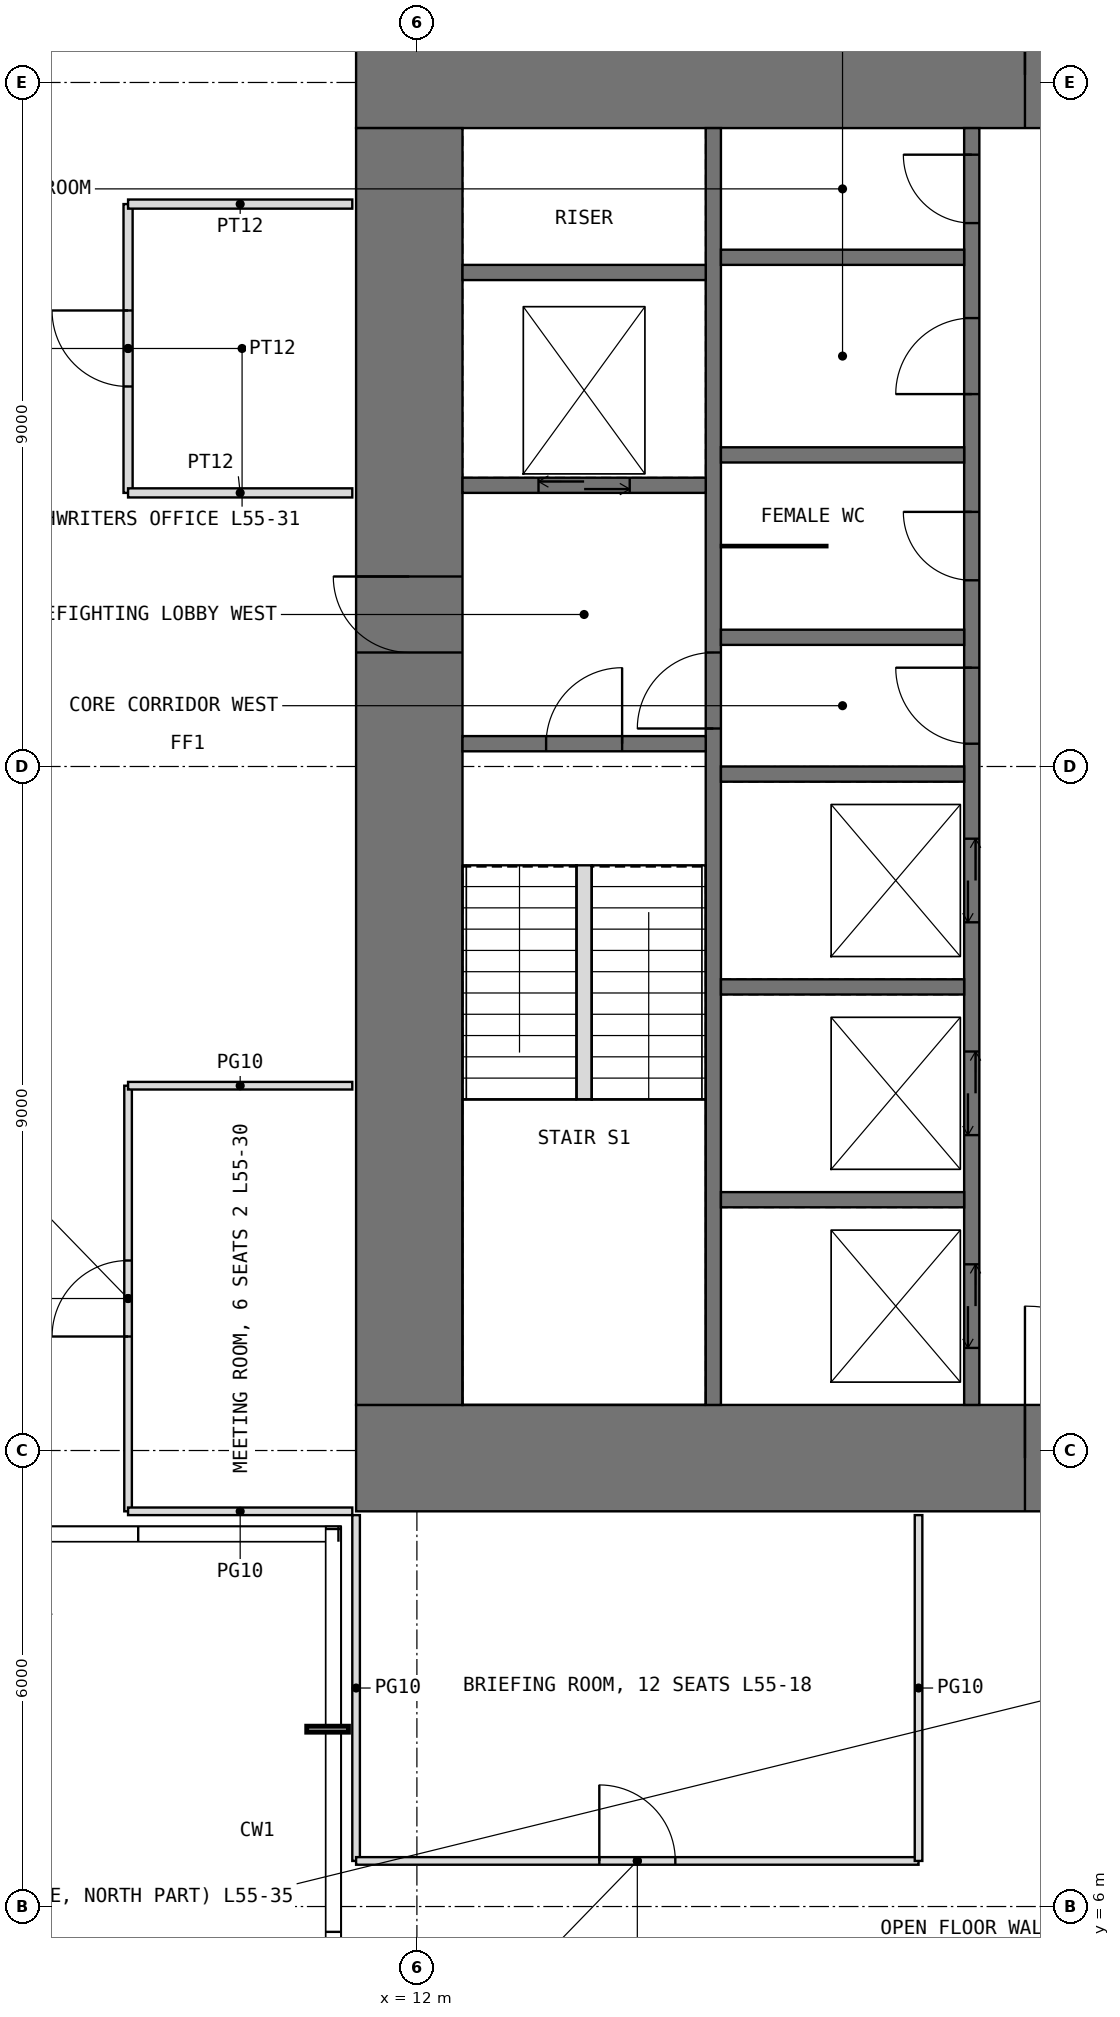
"""IFC4 building model, lengths in metres.
Left out: names, types, materials, properties, quantities, classifications, styles, units other than length and angle.
Written with IfcOpenShell. Run it as: python <this file> out.ifc"""

import sys

from ifc_helpers import new_model, si_unit, direction, frame, frame_2d, origin, place, context, subcontext, project, spatial, rectangle, extrude, element, fill, save


model = new_model("IFC4")
c1 = context("Model", 3, precision=1e-05, world=origin(), true_north=direction((0.0, 1.0)))
c2 = subcontext(c1, "Body", "Model", "MODEL_VIEW")
j1 = project(units=[si_unit("LENGTHUNIT", "METRE"), si_unit("PLANEANGLEUNIT", "RADIAN")], contexts=[c1])
p1 = place(None, origin())
s1 = spatial("IfcSite", under=j1, at=p1, CompositionType="ELEMENT")
p2 = place(p1, origin())
s2 = spatial("IfcBuilding", under=s1, at=p2, CompositionType="ELEMENT")
p3 = place(p2, frame((0.0, 0.0, 230.5)))
s3 = spatial("IfcBuildingStorey", under=s2, at=p3, CompositionType="ELEMENT", Elevation=230.5)
p4 = place(p3, frame((11.2, 11.9, -0.05), z_axis=(0.0, 0.0, 1.0), x_axis=(1.0, 0.0, 0.0)))
e1 = element("IfcWall", 1, at=p4, inside=s3, PredefinedType="SHEAR", context=c2, shape_type="SweptSolid", body=[
    extrude(rectangle(XDim=19.6, YDim=1.4, at=frame_2d((9.8, 0.0))), origin(), (0.0, 0.0, 1.0), 3.8),
])
p5 = place(p4, frame((8.8, 0.0, 0.05)))
e2 = element("IfcOpeningElement", 2, at=p5, cuts=e1, PredefinedType="OPENING", context=c2, shape_type="SweptSolid", body=[
    extrude(rectangle(XDim=2.0, YDim=2.2, at=frame_2d((1.0, 1.1))), frame((0.0, 0.71, 0.0), z_axis=(0.0, -1.0, 0.0), x_axis=(1.0, 0.0, 0.0)), (0.0, 0.0, 1.0), 1.42),
])
p6 = place(p3, frame((11.2, 30.1, -0.05), z_axis=(0.0, 0.0, 1.0), x_axis=(1.0, 0.0, 0.0)))
e3 = element("IfcWall", 3, at=p6, inside=s3, PredefinedType="SHEAR", context=c2, shape_type="SweptSolid", body=[
    extrude(rectangle(XDim=19.6, YDim=1.4, at=frame_2d((9.8, 0.0))), origin(), (0.0, 0.0, 1.0), 3.8),
])
p7 = place(p6, frame((8.8, 0.0, 0.05)))
e4 = element("IfcOpeningElement", 4, at=p7, cuts=e3, PredefinedType="OPENING", context=c2, shape_type="SweptSolid", body=[
    extrude(rectangle(XDim=2.0, YDim=2.2, at=frame_2d((1.0, 1.1))), frame((0.0, 0.71, 0.0), z_axis=(0.0, -1.0, 0.0), x_axis=(1.0, 0.0, 0.0)), (0.0, 0.0, 1.0), 1.42),
])
p8 = place(p3, frame((11.9, 12.6, -0.05), z_axis=(0.0, 0.0, 1.0), x_axis=(0.0, 1.0, 0.0)))
e5 = element("IfcWall", 5, at=p8, inside=s3, PredefinedType="SHEAR", context=c2, shape_type="SweptSolid", body=[
    extrude(rectangle(XDim=16.8, YDim=1.4, at=frame_2d((8.4, 0.0))), origin(), (0.0, 0.0, 1.0), 3.8),
])
p9 = place(p8, frame((9.9, 0.0, 0.05)))
e6 = element("IfcOpeningElement", 6, at=p9, cuts=e5, PredefinedType="OPENING", context=c2, shape_type="SweptSolid", body=[
    extrude(rectangle(XDim=1.0, YDim=2.2, at=frame_2d((0.5, 1.1))), frame((0.0, 0.71, 0.0), z_axis=(0.0, -1.0, 0.0), x_axis=(1.0, 0.0, 0.0)), (0.0, 0.0, 1.0), 1.42),
])
p10 = place(p3, frame((15.9, 12.6, -0.05), z_axis=(0.0, 0.0, 1.0), x_axis=(0.0, 1.0, 0.0)))
e7 = element("IfcWall", 7, at=p10, inside=s3, PredefinedType="SHEAR", context=c2, shape_type="SweptSolid", body=[
    extrude(rectangle(XDim=16.8, YDim=0.2, at=frame_2d((8.4, 0.0))), origin(), (0.0, 0.0, 1.0), 3.8),
])
p11 = place(p10, frame((8.9, 0.0, 0.05)))
e8 = element("IfcOpeningElement", 8, at=p11, cuts=e7, PredefinedType="OPENING", context=c2, shape_type="SweptSolid", body=[
    extrude(rectangle(XDim=1.0, YDim=2.2, at=frame_2d((0.5, 1.1))), frame((0.0, 0.11, 0.0), z_axis=(0.0, -1.0, 0.0), x_axis=(1.0, 0.0, 0.0)), (0.0, 0.0, 1.0), 0.22),
])
p12 = place(p3, frame((19.3, 12.6, -0.05), z_axis=(0.0, 0.0, 1.0), x_axis=(0.0, 1.0, 0.0)))
e9 = element("IfcWall", 9, at=p12, inside=s3, PredefinedType="SHEAR", context=c2, shape_type="SweptSolid", body=[
    extrude(rectangle(XDim=16.8, YDim=0.2, at=frame_2d((8.4, 0.0))), origin(), (0.0, 0.0, 1.0), 3.8),
])
p13 = place(p12, frame((8.7, 0.0, 0.05)))
e10 = element("IfcOpeningElement", 10, at=p13, cuts=e9, PredefinedType="OPENING", context=c2, shape_type="SweptSolid", body=[
    extrude(rectangle(XDim=1.0, YDim=2.2, at=frame_2d((0.5, 1.1))), frame((0.0, 0.11, 0.0), z_axis=(0.0, -1.0, 0.0), x_axis=(1.0, 0.0, 0.0)), (0.0, 0.0, 1.0), 0.22),
])
p14 = place(p12, frame((10.85, 0.0, 0.05)))
e11 = element("IfcOpeningElement", 11, at=p14, cuts=e9, PredefinedType="OPENING", context=c2, shape_type="SweptSolid", body=[
    extrude(rectangle(XDim=0.9, YDim=2.2, at=frame_2d((0.45, 1.1))), frame((0.0, 0.11, 0.0), z_axis=(0.0, -1.0, 0.0), x_axis=(1.0, 0.0, 0.0)), (0.0, 0.0, 1.0), 0.22),
])
p15 = place(p12, frame((13.3, 0.0, 0.05)))
e12 = element("IfcOpeningElement", 12, at=p15, cuts=e9, PredefinedType="OPENING", context=c2, shape_type="SweptSolid", body=[
    extrude(rectangle(XDim=1.0, YDim=2.2, at=frame_2d((0.5, 1.1))), frame((0.0, 0.11, 0.0), z_axis=(0.0, -1.0, 0.0), x_axis=(1.0, 0.0, 0.0)), (0.0, 0.0, 1.0), 0.22),
])
p16 = place(p12, frame((15.55, 0.0, 0.05)))
e13 = element("IfcOpeningElement", 13, at=p16, cuts=e9, PredefinedType="OPENING", context=c2, shape_type="SweptSolid", body=[
    extrude(rectangle(XDim=0.9, YDim=2.2, at=frame_2d((0.45, 1.1))), frame((0.0, 0.11, 0.0), z_axis=(0.0, -1.0, 0.0), x_axis=(1.0, 0.0, 0.0)), (0.0, 0.0, 1.0), 0.22),
])
p17 = place(p12, frame((0.75, 0.0, 0.05)))
e14 = element("IfcOpeningElement", 14, at=p17, cuts=e9, PredefinedType="OPENING", context=c2, shape_type="SweptSolid", body=[
    extrude(rectangle(XDim=1.1, YDim=2.2, at=frame_2d((0.55, 1.1))), frame((0.0, 0.11, 0.0), z_axis=(0.0, -1.0, 0.0), x_axis=(1.0, 0.0, 0.0)), (0.0, 0.0, 1.0), 0.22),
])
p18 = place(p12, frame((3.55, 0.0, 0.05)))
e15 = element("IfcOpeningElement", 15, at=p18, cuts=e9, PredefinedType="OPENING", context=c2, shape_type="SweptSolid", body=[
    extrude(rectangle(XDim=1.1, YDim=2.2, at=frame_2d((0.55, 1.1))), frame((0.0, 0.11, 0.0), z_axis=(0.0, -1.0, 0.0), x_axis=(1.0, 0.0, 0.0)), (0.0, 0.0, 1.0), 0.22),
])
p19 = place(p12, frame((6.35, 0.0, 0.05)))
e16 = element("IfcOpeningElement", 16, at=p19, cuts=e9, PredefinedType="OPENING", context=c2, shape_type="SweptSolid", body=[
    extrude(rectangle(XDim=1.1, YDim=2.2, at=frame_2d((0.55, 1.1))), frame((0.0, 0.11, 0.0), z_axis=(0.0, -1.0, 0.0), x_axis=(1.0, 0.0, 0.0)), (0.0, 0.0, 1.0), 0.22),
])
p20 = place(p3, frame((12.6, 21.3, -0.05), z_axis=(0.0, 0.0, 1.0), x_axis=(1.0, 0.0, 0.0)))
e17 = element("IfcWall", 17, at=p20, inside=s3, PredefinedType="SHEAR", context=c2, shape_type="SweptSolid", body=[
    extrude(rectangle(XDim=3.2, YDim=0.2, at=frame_2d((1.6, 0.0))), origin(), (0.0, 0.0, 1.0), 3.8),
])
p21 = place(p20, frame((1.1, 0.0, 0.05)))
e18 = element("IfcOpeningElement", 18, at=p21, cuts=e17, PredefinedType="OPENING", context=c2, shape_type="SweptSolid", body=[
    extrude(rectangle(XDim=1.0, YDim=2.2, at=frame_2d((0.5, 1.1))), frame((0.0, 0.11, 0.0), z_axis=(0.0, -1.0, 0.0), x_axis=(1.0, 0.0, 0.0)), (0.0, 0.0, 1.0), 0.22),
])
p22 = place(p3, frame((12.6, 24.7, -0.05), z_axis=(0.0, 0.0, 1.0), x_axis=(1.0, 0.0, 0.0)))
e19 = element("IfcWall", 19, at=p22, inside=s3, PredefinedType="SHEAR", context=c2, shape_type="SweptSolid", body=[
    extrude(rectangle(XDim=3.2, YDim=0.2, at=frame_2d((1.6, 0.0))), origin(), (0.0, 0.0, 1.0), 3.8),
])
p23 = place(p22, frame((1.0, 0.0, 0.05)))
e20 = element("IfcOpeningElement", 20, at=p23, cuts=e19, PredefinedType="OPENING", context=c2, shape_type="SweptSolid", body=[
    extrude(rectangle(XDim=1.2, YDim=2.2, at=frame_2d((0.6, 1.1))), frame((0.0, 0.11, 0.0), z_axis=(0.0, -1.0, 0.0), x_axis=(1.0, 0.0, 0.0)), (0.0, 0.0, 1.0), 0.22),
])
for number, where, z_axis, x_axis in (
    (21, (12.6, 27.5, -0.05), (0.0, 0.0, 1.0), (1.0, 0.0, 0.0)),
    (22, (16.0, 15.3, -0.05), (0.0, 0.0, 1.0), (1.0, 0.0, 0.0)),
    (23, (16.0, 18.1, -0.05), (0.0, 0.0, 1.0), (1.0, 0.0, 0.0)),
    (24, (16.0, 20.9, -0.05), (0.0, 0.0, 1.0), (1.0, 0.0, 0.0)),
    (25, (16.0, 22.7, -0.05), (0.0, 0.0, 1.0), (1.0, 0.0, 0.0)),
    (26, (16.0, 25.1, -0.05), (0.0, 0.0, 1.0), (1.0, 0.0, 0.0)),
    (27, (16.0, 27.7, -0.05), (0.0, 0.0, 1.0), (1.0, 0.0, 0.0)),
):
    element("IfcWall", number, at=place(p3, frame(where, z_axis=z_axis, x_axis=x_axis)), inside=s3, PredefinedType="SHEAR", context=c2, shape_type="SweptSolid", body=[
        extrude(rectangle(XDim=3.2, YDim=0.2, at=frame_2d((1.6, 0.0))), origin(), (0.0, 0.0, 1.0), 3.8),
    ])
p24 = place(p3, frame((16.0, 23.9, 0.0), z_axis=(0.0, 0.0, 1.0), x_axis=(1.0, 0.0, 0.0)))
e28 = element("IfcWall", 28, at=p24, inside=s3, PredefinedType="PARTITIONING", context=c2, shape_type="SweptSolid", body=[
    extrude(rectangle(XDim=1.4, YDim=0.03, at=frame_2d((0.7, 0.0))), origin(), (0.0, 0.0, 1.0), 3.55),
])
p25 = place(p3, frame((8.2, 11.2, 0.0), z_axis=(0.0, 0.0, 1.0), x_axis=(0.0, 1.0, 0.0)))
e29 = element("IfcWall", 29, at=p25, inside=s3, PredefinedType="PARTITIONING", context=c2, shape_type="SweptSolid", body=[
    extrude(rectangle(XDim=5.6, YDim=0.1, at=frame_2d((2.8, 0.0))), origin(), (0.0, 0.0, 1.0), 3.55),
])
p26 = place(p25, frame((2.3, 0.0, 0.0)))
e30 = element("IfcOpeningElement", 30, at=p26, cuts=e29, PredefinedType="OPENING", context=c2, shape_type="SweptSolid", body=[
    extrude(rectangle(XDim=1.0, YDim=2.4, at=frame_2d((0.5, 1.2))), frame((0.0, 0.06, 0.0), z_axis=(0.0, -1.0, 0.0), x_axis=(1.0, 0.0, 0.0)), (0.0, 0.0, 1.0), 0.12),
])
for number, where, z_axis, x_axis in (
    (31, (8.2, 11.2, 0.0), (0.0, 0.0, 1.0), (1.0, 0.0, 0.0)),
    (32, (8.2, 16.8, 0.0), (0.0, 0.0, 1.0), (1.0, 0.0, 0.0)),
):
    element("IfcWall", number, at=place(p3, frame(where, z_axis=z_axis, x_axis=x_axis)), inside=s3, PredefinedType="PARTITIONING", context=c2, shape_type="SweptSolid", body=[
        extrude(rectangle(XDim=2.95, YDim=0.1, at=frame_2d((1.475, 0.0))), origin(), (0.0, 0.0, 1.0), 3.55),
    ])
p27 = place(p3, frame((8.2, 24.6, 0.0), z_axis=(0.0, 0.0, 1.0), x_axis=(0.0, 1.0, 0.0)))
e33 = element("IfcWall", 33, at=p27, inside=s3, PredefinedType="PARTITIONING", context=c2, shape_type="SweptSolid", body=[
    extrude(rectangle(XDim=3.8, YDim=0.12, at=frame_2d((1.9, 0.0))), origin(), (0.0, 0.0, 1.0), 3.55),
])
p28 = place(p27, frame((1.4, 0.0, 0.0)))
e34 = element("IfcOpeningElement", 34, at=p28, cuts=e33, PredefinedType="OPENING", context=c2, shape_type="SweptSolid", body=[
    extrude(rectangle(XDim=1.0, YDim=2.2, at=frame_2d((0.5, 1.1))), frame((0.0, 0.07, 0.0), z_axis=(0.0, -1.0, 0.0), x_axis=(1.0, 0.0, 0.0)), (0.0, 0.0, 1.0), 0.14),
])
for number, where, z_axis, x_axis in (
    (35, (8.2, 24.6, 0.0), (0.0, 0.0, 1.0), (1.0, 0.0, 0.0)),
    (36, (8.2, 28.4, 0.0), (0.0, 0.0, 1.0), (1.0, 0.0, 0.0)),
):
    element("IfcWall", number, at=place(p3, frame(where, z_axis=z_axis, x_axis=x_axis)), inside=s3, PredefinedType="PARTITIONING", context=c2, shape_type="SweptSolid", body=[
        extrude(rectangle(XDim=2.95, YDim=0.12, at=frame_2d((1.475, 0.0))), origin(), (0.0, 0.0, 1.0), 3.55),
    ])
p29 = place(p3, frame((11.2, 6.6, 0.0), z_axis=(0.0, 0.0, 1.0), x_axis=(0.0, 1.0, 0.0)))
e37 = element("IfcWall", 37, at=p29, inside=s3, PredefinedType="PARTITIONING", context=c2, shape_type="SweptSolid", body=[
    extrude(rectangle(XDim=4.55, YDim=0.1, at=frame_2d((2.275, 0.0))), origin(), (0.0, 0.0, 1.0), 3.55),
])
p30 = place(p3, frame((11.2, 6.6, 0.0), z_axis=(0.0, 0.0, 1.0), x_axis=(1.0, 0.0, 0.0)))
e38 = element("IfcWall", 38, at=p30, inside=s3, PredefinedType="PARTITIONING", context=c2, shape_type="SweptSolid", body=[
    extrude(rectangle(XDim=7.4, YDim=0.1, at=frame_2d((3.7, 0.0))), origin(), (0.0, 0.0, 1.0), 3.55),
])
p31 = place(p30, frame((3.2, 0.0, 0.0)))
e39 = element("IfcOpeningElement", 39, at=p31, cuts=e38, PredefinedType="OPENING", context=c2, shape_type="SweptSolid", body=[
    extrude(rectangle(XDim=1.0, YDim=2.4, at=frame_2d((0.5, 1.2))), frame((0.0, 0.06, 0.0), z_axis=(0.0, -1.0, 0.0), x_axis=(1.0, 0.0, 0.0)), (0.0, 0.0, 1.0), 0.12),
])
p32 = place(p3, frame((18.6, 6.6, 0.0), z_axis=(0.0, 0.0, 1.0), x_axis=(0.0, 1.0, 0.0)))
e40 = element("IfcWall", 40, at=p32, inside=s3, PredefinedType="PARTITIONING", context=c2, shape_type="SweptSolid", body=[
    extrude(rectangle(XDim=4.55, YDim=0.1, at=frame_2d((2.275, 0.0))), origin(), (0.0, 0.0, 1.0), 3.55),
])
p33 = place(p3, frame((14.2, 16.62, 0.0), z_axis=(0.0, 0.0, 1.0), x_axis=(0.0, 1.0, 0.0)))
e41 = element("IfcWall", 41, at=p33, inside=s3, PredefinedType="PARTITIONING", context=c2, shape_type="SweptSolid", body=[
    extrude(rectangle(XDim=3.08, YDim=0.2, at=frame_2d((1.54, 0.0))), origin(), (0.0, 0.0, 1.0), 4.0),
])
p34 = place(p5, origin())
e42 = element("IfcDoor", 42, at=p34, inside=s3, OperationType="DOUBLE_DOOR_SINGLE_SWING", PredefinedType="DOOR", context=c2, shape_type="SweptSolid", body=[
    extrude(rectangle(XDim=2.0, YDim=2.2, at=frame_2d((1.0, 1.1))), frame((0.0, 0.025, 0.0), z_axis=(0.0, -1.0, 0.0), x_axis=(1.0, 0.0, 0.0)), (0.0, 0.0, 1.0), 0.05),
])
fill(e2, e42)
p35 = place(p7, origin())
e43 = element("IfcDoor", 43, at=p35, inside=s3, OperationType="DOUBLE_DOOR_SINGLE_SWING", PredefinedType="DOOR", context=c2, shape_type="SweptSolid", body=[
    extrude(rectangle(XDim=2.0, YDim=2.2, at=frame_2d((1.0, 1.1))), frame((0.0, 0.025, 0.0), z_axis=(0.0, -1.0, 0.0), x_axis=(1.0, 0.0, 0.0)), (0.0, 0.0, 1.0), 0.05),
])
fill(e4, e43)
p36 = place(p9, origin())
e44 = element("IfcDoor", 44, at=p36, inside=s3, OperationType="SINGLE_SWING_RIGHT", PredefinedType="DOOR", context=c2, shape_type="SweptSolid", body=[
    extrude(rectangle(XDim=1.0, YDim=2.2, at=frame_2d((0.5, 1.1))), frame((0.0, 0.025, 0.0), z_axis=(0.0, -1.0, 0.0), x_axis=(1.0, 0.0, 0.0)), (0.0, 0.0, 1.0), 0.05),
])
fill(e6, e44)
p37 = place(p21, origin())
e45 = element("IfcDoor", 45, at=p37, inside=s3, OperationType="SINGLE_SWING_RIGHT", PredefinedType="DOOR", context=c2, shape_type="SweptSolid", body=[
    extrude(rectangle(XDim=1.0, YDim=2.2, at=frame_2d((0.5, 1.1))), frame((0.0, 0.025, 0.0), z_axis=(0.0, -1.0, 0.0), x_axis=(1.0, 0.0, 0.0)), (0.0, 0.0, 1.0), 0.05),
])
fill(e18, e45)
p38 = place(p11, origin())
e46 = element("IfcDoor", 46, at=p38, inside=s3, OperationType="SINGLE_SWING_LEFT", PredefinedType="DOOR", context=c2, shape_type="SweptSolid", body=[
    extrude(rectangle(XDim=1.0, YDim=2.2, at=frame_2d((0.5, 1.1))), frame((0.0, 0.025, 0.0), z_axis=(0.0, -1.0, 0.0), x_axis=(1.0, 0.0, 0.0)), (0.0, 0.0, 1.0), 0.05),
])
fill(e8, e46)
p39 = place(p13, origin())
e47 = element("IfcDoor", 47, at=p39, inside=s3, OperationType="SINGLE_SWING_RIGHT", PredefinedType="DOOR", context=c2, shape_type="SweptSolid", body=[
    extrude(rectangle(XDim=1.0, YDim=2.2, at=frame_2d((0.5, 1.1))), frame((0.0, 0.025, 0.0), z_axis=(0.0, -1.0, 0.0), x_axis=(1.0, 0.0, 0.0)), (0.0, 0.0, 1.0), 0.05),
])
fill(e10, e47)
p40 = place(p14, origin())
e48 = element("IfcDoor", 48, at=p40, inside=s3, OperationType="SINGLE_SWING_RIGHT", PredefinedType="DOOR", context=c2, shape_type="SweptSolid", body=[
    extrude(rectangle(XDim=0.9, YDim=2.2, at=frame_2d((0.45, 1.1))), frame((0.0, 0.025, 0.0), z_axis=(0.0, -1.0, 0.0), x_axis=(1.0, 0.0, 0.0)), (0.0, 0.0, 1.0), 0.05),
])
fill(e11, e48)
p41 = place(p15, origin())
e49 = element("IfcDoor", 49, at=p41, inside=s3, OperationType="SINGLE_SWING_LEFT", PredefinedType="DOOR", context=c2, shape_type="SweptSolid", body=[
    extrude(rectangle(XDim=1.0, YDim=2.2, at=frame_2d((0.5, 1.1))), frame((0.0, 0.025, 0.0), z_axis=(0.0, -1.0, 0.0), x_axis=(1.0, 0.0, 0.0)), (0.0, 0.0, 1.0), 0.05),
])
fill(e12, e49)
p42 = place(p16, origin())
e50 = element("IfcDoor", 50, at=p42, inside=s3, OperationType="SINGLE_SWING_RIGHT", PredefinedType="DOOR", context=c2, shape_type="SweptSolid", body=[
    extrude(rectangle(XDim=0.9, YDim=2.2, at=frame_2d((0.45, 1.1))), frame((0.0, 0.025, 0.0), z_axis=(0.0, -1.0, 0.0), x_axis=(1.0, 0.0, 0.0)), (0.0, 0.0, 1.0), 0.05),
])
fill(e13, e50)
p43 = place(p31, origin())
e51 = element("IfcDoor", 51, at=p43, inside=s3, OperationType="SINGLE_SWING_LEFT", PredefinedType="DOOR", context=c2, shape_type="SweptSolid", body=[
    extrude(rectangle(XDim=1.0, YDim=2.4, at=frame_2d((0.5, 1.2))), frame((0.0, 0.025, 0.0), z_axis=(0.0, -1.0, 0.0), x_axis=(1.0, 0.0, 0.0)), (0.0, 0.0, 1.0), 0.05),
])
fill(e39, e51)
p44 = place(p26, origin())
e52 = element("IfcDoor", 52, at=p44, inside=s3, OperationType="SINGLE_SWING_LEFT", PredefinedType="DOOR", context=c2, shape_type="SweptSolid", body=[
    extrude(rectangle(XDim=1.0, YDim=2.4, at=frame_2d((0.5, 1.2))), frame((0.0, 0.025, 0.0), z_axis=(0.0, -1.0, 0.0), x_axis=(1.0, 0.0, 0.0)), (0.0, 0.0, 1.0), 0.05),
])
fill(e30, e52)
p45 = place(p28, origin())
e53 = element("IfcDoor", 53, at=p45, inside=s3, OperationType="SINGLE_SWING_RIGHT", PredefinedType="DOOR", context=c2, shape_type="SweptSolid", body=[
    extrude(rectangle(XDim=1.0, YDim=2.2, at=frame_2d((0.5, 1.1))), frame((0.0, 0.025, 0.0), z_axis=(0.0, -1.0, 0.0), x_axis=(1.0, 0.0, 0.0)), (0.0, 0.0, 1.0), 0.05),
])
fill(e34, e53)
p46 = place(p17, origin())
e54 = element("IfcDoor", 54, at=p46, inside=s3, OperationType="DOUBLE_DOOR_SLIDING", PredefinedType="DOOR", context=c2, shape_type="SweptSolid", body=[
    extrude(rectangle(XDim=1.1, YDim=2.2, at=frame_2d((0.55, 1.1))), frame((0.0, 0.025, 0.0), z_axis=(0.0, -1.0, 0.0), x_axis=(1.0, 0.0, 0.0)), (0.0, 0.0, 1.0), 0.05),
])
fill(e14, e54)
p47 = place(p18, origin())
e55 = element("IfcDoor", 55, at=p47, inside=s3, OperationType="DOUBLE_DOOR_SLIDING", PredefinedType="DOOR", context=c2, shape_type="SweptSolid", body=[
    extrude(rectangle(XDim=1.1, YDim=2.2, at=frame_2d((0.55, 1.1))), frame((0.0, 0.025, 0.0), z_axis=(0.0, -1.0, 0.0), x_axis=(1.0, 0.0, 0.0)), (0.0, 0.0, 1.0), 0.05),
])
fill(e15, e55)
p48 = place(p19, origin())
e56 = element("IfcDoor", 56, at=p48, inside=s3, OperationType="DOUBLE_DOOR_SLIDING", PredefinedType="DOOR", context=c2, shape_type="SweptSolid", body=[
    extrude(rectangle(XDim=1.1, YDim=2.2, at=frame_2d((0.55, 1.1))), frame((0.0, 0.025, 0.0), z_axis=(0.0, -1.0, 0.0), x_axis=(1.0, 0.0, 0.0)), (0.0, 0.0, 1.0), 0.05),
])
fill(e16, e56)
p49 = place(p23, origin())
e57 = element("IfcDoor", 57, at=p49, inside=s3, OperationType="DOUBLE_DOOR_SLIDING", PredefinedType="DOOR", context=c2, shape_type="SweptSolid", body=[
    extrude(rectangle(XDim=1.2, YDim=2.2, at=frame_2d((0.6, 1.1))), frame((0.0, 0.025, 0.0), z_axis=(0.0, -1.0, 0.0), x_axis=(1.0, 0.0, 0.0)), (0.0, 0.0, 1.0), 0.05),
])
fill(e20, e57)
save(model, sys.argv[1])
